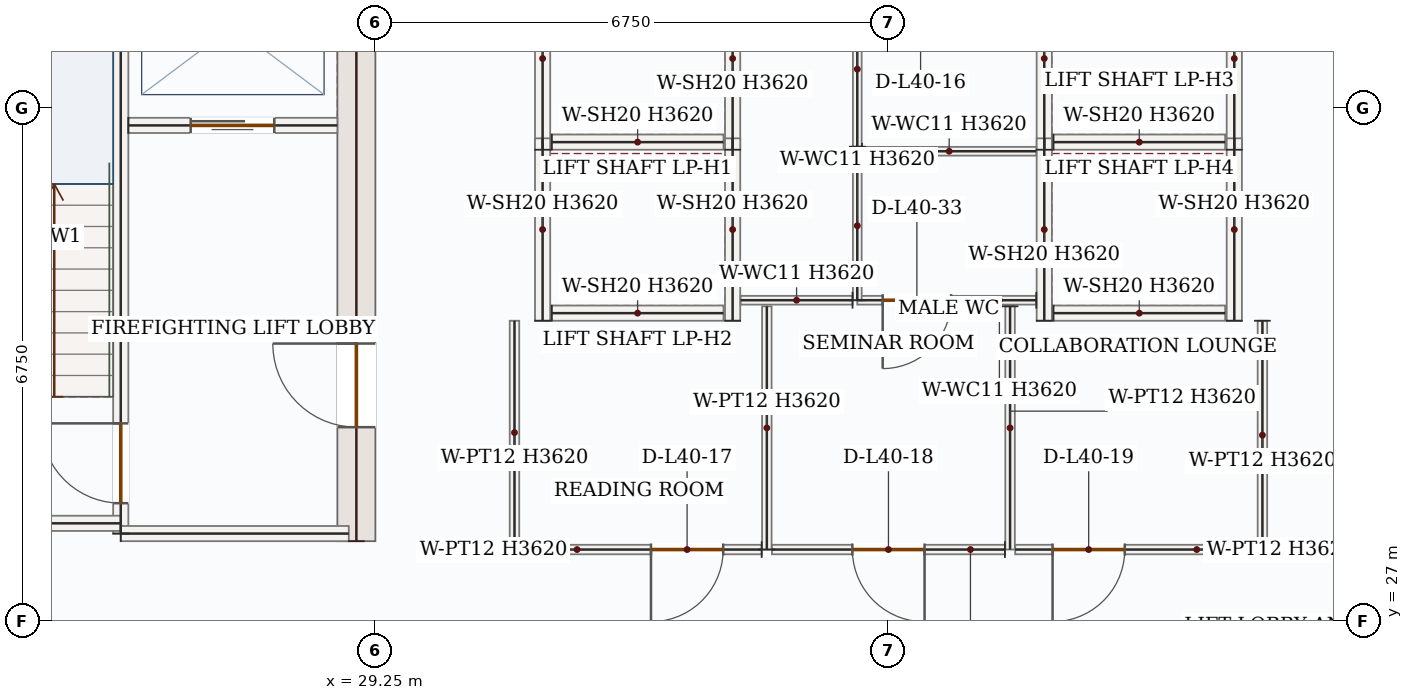
"""IFC4 building model, lengths in metres.
Left out: names, types, materials, properties, quantities, classifications, styles, units other than length and angle.
Written with IfcOpenShell. Run it as: python <this file> out.ifc"""

import sys

from ifc_helpers import new_model, si_unit, direction, frame, frame_2d, origin, place, context, subcontext, project, spatial, rectangle, extrude, source, transform, mapped, element, fill, save


model = new_model("IFC4")
c1 = context("Model", 3, precision=1e-05, world=origin(), true_north=direction((0.0, 1.0)))
c2 = subcontext(c1, "Body", "Model", "MODEL_VIEW")
j1 = project(units=[si_unit("LENGTHUNIT", "METRE"), si_unit("PLANEANGLEUNIT", "RADIAN")], contexts=[c1])
p1 = place(None, origin())
s1 = spatial("IfcSite", under=j1, at=p1, CompositionType="ELEMENT")
p2 = place(p1, origin())
s2 = spatial("IfcBuilding", under=s1, at=p2, CompositionType="ELEMENT")
p3 = place(p2, frame((0.0, 0.0, 174.6)))
s3 = spatial("IfcBuildingStorey", under=s2, at=p3, CompositionType="ELEMENT", Elevation=174.6)
p4 = place(p3, frame((29.0, 28.05, 0.0), z_axis=(0.0, 0.0, 1.0), x_axis=(0.0, 1.0, 0.0)))
e1 = element("IfcWall", 1, at=p4, inside=s3, PredefinedType="SHEAR", context=c2, shape_type="SweptSolid", body=[
    extrude(rectangle(XDim=8.55, YDim=0.5, at=frame_2d((4.275, 0.0))), origin(), (0.0, 0.0, 1.0), 3.62),
])
p5 = place(p4, frame((1.5, 0.0, 0.0)))
e2 = element("IfcOpeningElement", 2, at=p5, cuts=e1, PredefinedType="OPENING", context=c2, shape_type="SweptSolid", body=[
    extrude(rectangle(XDim=1.1, YDim=2.2, at=frame_2d((0.55, 1.1))), frame((0.0, 0.26, 0.0), z_axis=(0.0, -1.0, 0.0), x_axis=(1.0, 0.0, 0.0)), (0.0, 0.0, 1.0), 0.52),
])
p6 = place(p3, frame((25.9, 28.15, 0.0), z_axis=(0.0, 0.0, 1.0), x_axis=(0.0, 1.0, 0.0)))
e3 = element("IfcWall", 3, at=p6, inside=s3, PredefinedType="SOLIDWALL", context=c2, shape_type="SweptSolid", body=[
    extrude(rectangle(XDim=8.0, YDim=0.2, at=frame_2d((4.0, 0.0))), origin(), (0.0, 0.0, 1.0), 3.62),
])
p7 = place(p6, frame((0.4, 0.0, 0.0)))
e4 = element("IfcOpeningElement", 4, at=p7, cuts=e3, PredefinedType="OPENING", context=c2, shape_type="SweptSolid", body=[
    extrude(rectangle(XDim=1.05, YDim=2.15, at=frame_2d((0.525, 1.075))), frame((0.0, 0.11, 0.0), z_axis=(0.0, -1.0, 0.0), x_axis=(1.0, 0.0, 0.0)), (0.0, 0.0, 1.0), 0.22),
])
m1 = source(origin(), c2, "Body", "SweptSolid", [
    extrude(rectangle(XDim=4.25, YDim=0.2, at=frame_2d((2.125, 0.0))), origin(), (0.0, 0.0, 1.0), 3.62),
])
p8 = place(p3, frame((21.65, 28.285, 0.0), z_axis=(0.0, 0.0, 1.0), x_axis=(1.0, 0.0, 0.0)))
e5 = element("IfcWall", 5, at=p8, inside=s3, PredefinedType="SOLIDWALL", context=c2, shape_type="MappedRepresentation", body=[
    mapped(m1, transform((0.0, 0.0, 0.0), x_axis=(1.0, 0.0, 0.0), y_axis=(0.0, 1.0, 0.0), z_axis=(0.0, 0.0, 1.0), scale=1.0)),
])
m2 = source(origin(), c2, "Body", "SweptSolid", [
    extrude(rectangle(XDim=3.0, YDim=0.2, at=frame_2d((1.5, 0.0))), origin(), (0.0, 0.0, 1.0), 3.62),
])
p9 = place(p3, frame((25.9, 28.15, 0.0), z_axis=(0.0, 0.0, 1.0), x_axis=(1.0, 0.0, 0.0)))
e6 = element("IfcWall", 6, at=p9, inside=s3, PredefinedType="SOLIDWALL", context=c2, shape_type="MappedRepresentation", body=[
    mapped(m2, transform((0.0, 0.0, 0.0), x_axis=(1.0, 0.0, 0.0), y_axis=(0.0, 1.0, 0.0), z_axis=(0.0, 0.0, 1.0), scale=1.0)),
])
p10 = place(p3, frame((26.0, 33.52, 0.0), z_axis=(0.0, 0.0, 1.0), x_axis=(1.0, 0.0, 0.0)))
e7 = element("IfcWall", 7, at=p10, inside=s3, PredefinedType="SOLIDWALL", context=c2, shape_type="SweptSolid", body=[
    extrude(rectangle(XDim=2.75, YDim=0.2, at=frame_2d((1.375, 0.0))), origin(), (0.0, 0.0, 1.0), 3.62),
])
p11 = place(p10, frame((0.82, 0.0, 0.0)))
e8 = element("IfcOpeningElement", 8, at=p11, cuts=e7, PredefinedType="OPENING", context=c2, shape_type="SweptSolid", body=[
    extrude(rectangle(XDim=1.1, YDim=2.15, at=frame_2d((0.55, 1.075))), frame((0.0, 0.11, 0.0), z_axis=(0.0, -1.0, 0.0), x_axis=(1.0, 0.0, 0.0)), (0.0, 0.0, 1.0), 0.22),
])
m3 = source(origin(), c2, "Body", "SweptSolid", [
    extrude(rectangle(XDim=2.4, YDim=0.2, at=frame_2d((1.2, 0.0))), origin(), (0.0, 0.0, 1.0), 3.62),
])
for number, where, z_axis, x_axis in (
    (9, (31.45, 33.2, 0.0), (0.0, 0.0, 1.0), (0.0, 1.0, 0.0)),
    (10, (33.95, 33.2, 0.0), (0.0, 0.0, 1.0), (0.0, 1.0, 0.0)),
):
    element("IfcWall", number, at=place(p3, frame(where, z_axis=z_axis, x_axis=x_axis)), inside=s3, PredefinedType="SOLIDWALL", context=c2, shape_type="MappedRepresentation", body=[
        mapped(m3, transform((0.0, 0.0, 0.0), x_axis=(1.0, 0.0, 0.0), y_axis=(0.0, 1.0, 0.0), z_axis=(0.0, 0.0, 1.0), scale=1.0)),
    ])
m4 = source(origin(), c2, "Body", "SweptSolid", [
    extrude(rectangle(XDim=2.26, YDim=0.2, at=frame_2d((1.13, 0.0))), origin(), (0.0, 0.0, 1.0), 3.62),
])
p12 = place(p3, frame((31.57, 33.3, 0.0), z_axis=(0.0, 0.0, 1.0), x_axis=(1.0, 0.0, 0.0)))
e11 = element("IfcWall", 11, at=p12, inside=s3, PredefinedType="SOLIDWALL", context=c2, shape_type="MappedRepresentation", body=[
    mapped(m4, transform((0.0, 0.0, 0.0), x_axis=(1.0, 0.0, 0.0), y_axis=(0.0, 1.0, 0.0), z_axis=(0.0, 0.0, 1.0), scale=1.0)),
])
for number, where, z_axis, x_axis in (
    (12, (31.45, 30.95, 0.0), (0.0, 0.0, 1.0), (0.0, 1.0, 0.0)),
    (13, (33.95, 30.95, 0.0), (0.0, 0.0, 1.0), (0.0, 1.0, 0.0)),
):
    element("IfcWall", number, at=place(p3, frame(where, z_axis=z_axis, x_axis=x_axis)), inside=s3, PredefinedType="SOLIDWALL", context=c2, shape_type="MappedRepresentation", body=[
        mapped(m3, transform((0.0, 0.0, 0.0), x_axis=(1.0, 0.0, 0.0), y_axis=(0.0, 1.0, 0.0), z_axis=(0.0, 0.0, 1.0), scale=1.0)),
    ])
p13 = place(p3, frame((31.57, 31.05, 0.0), z_axis=(0.0, 0.0, 1.0), x_axis=(1.0, 0.0, 0.0)))
e14 = element("IfcWall", 14, at=p13, inside=s3, PredefinedType="SOLIDWALL", context=c2, shape_type="MappedRepresentation", body=[
    mapped(m4, transform((0.0, 0.0, 0.0), x_axis=(1.0, 0.0, 0.0), y_axis=(0.0, 1.0, 0.0), z_axis=(0.0, 0.0, 1.0), scale=1.0)),
])
for number, where, z_axis, x_axis in (
    (15, (38.05, 33.2, 0.0), (0.0, 0.0, 1.0), (0.0, 1.0, 0.0)),
    (16, (40.55, 33.2, 0.0), (0.0, 0.0, 1.0), (0.0, 1.0, 0.0)),
):
    element("IfcWall", number, at=place(p3, frame(where, z_axis=z_axis, x_axis=x_axis)), inside=s3, PredefinedType="SOLIDWALL", context=c2, shape_type="MappedRepresentation", body=[
        mapped(m3, transform((0.0, 0.0, 0.0), x_axis=(1.0, 0.0, 0.0), y_axis=(0.0, 1.0, 0.0), z_axis=(0.0, 0.0, 1.0), scale=1.0)),
    ])
p14 = place(p3, frame((38.17, 33.3, 0.0), z_axis=(0.0, 0.0, 1.0), x_axis=(1.0, 0.0, 0.0)))
e17 = element("IfcWall", 17, at=p14, inside=s3, PredefinedType="SOLIDWALL", context=c2, shape_type="MappedRepresentation", body=[
    mapped(m4, transform((0.0, 0.0, 0.0), x_axis=(1.0, 0.0, 0.0), y_axis=(0.0, 1.0, 0.0), z_axis=(0.0, 0.0, 1.0), scale=1.0)),
])
for number, where, z_axis, x_axis in (
    (18, (38.05, 30.95, 0.0), (0.0, 0.0, 1.0), (0.0, 1.0, 0.0)),
    (19, (40.55, 30.95, 0.0), (0.0, 0.0, 1.0), (0.0, 1.0, 0.0)),
):
    element("IfcWall", number, at=place(p3, frame(where, z_axis=z_axis, x_axis=x_axis)), inside=s3, PredefinedType="SOLIDWALL", context=c2, shape_type="MappedRepresentation", body=[
        mapped(m3, transform((0.0, 0.0, 0.0), x_axis=(1.0, 0.0, 0.0), y_axis=(0.0, 1.0, 0.0), z_axis=(0.0, 0.0, 1.0), scale=1.0)),
    ])
p15 = place(p3, frame((38.17, 31.05, 0.0), z_axis=(0.0, 0.0, 1.0), x_axis=(1.0, 0.0, 0.0)))
e20 = element("IfcWall", 20, at=p15, inside=s3, PredefinedType="SOLIDWALL", context=c2, shape_type="MappedRepresentation", body=[
    mapped(m4, transform((0.0, 0.0, 0.0), x_axis=(1.0, 0.0, 0.0), y_axis=(0.0, 1.0, 0.0), z_axis=(0.0, 0.0, 1.0), scale=1.0)),
])
p16 = place(p3, frame((37.945, 31.22, 0.0), z_axis=(0.0, 0.0, 1.0), x_axis=(-1.0, 0.0, 0.0)))
e21 = element("IfcWall", 21, at=p16, inside=s3, PredefinedType="PARTITIONING", context=c2, shape_type="SweptSolid", body=[
    extrude(rectangle(XDim=2.355, YDim=0.115, at=frame_2d((1.177, 0.0))), origin(), (0.0, 0.0, 1.0), 3.62),
])
p17 = place(p16, frame((1.121, 0.0, 0.0)))
e22 = element("IfcOpeningElement", 22, at=p17, cuts=e21, PredefinedType="OPENING", context=c2, shape_type="SweptSolid", body=[
    extrude(rectangle(XDim=0.9, YDim=2.1, at=frame_2d((0.45, 1.05))), frame((0.0, 0.067, 0.0), z_axis=(0.0, -1.0, 0.0), x_axis=(1.0, 0.0, 0.0)), (0.0, 0.0, 1.0), 0.135),
])
m5 = source(origin(), c2, "Body", "SweptSolid", [
    extrude(rectangle(XDim=1.96, YDim=0.115, at=frame_2d((0.98, 0.0))), origin(), (0.0, 0.0, 1.0), 3.62),
])
p18 = place(p3, frame((35.59, 31.22, 0.0), z_axis=(0.0, 0.0, 1.0), x_axis=(0.0, 1.0, 0.0)))
e23 = element("IfcWall", 23, at=p18, inside=s3, PredefinedType="PARTITIONING", context=c2, shape_type="MappedRepresentation", body=[
    mapped(m5, transform((0.0, 0.0, 0.0), x_axis=(1.0, 0.0, 0.0), y_axis=(0.0, 1.0, 0.0), z_axis=(0.0, 0.0, 1.0), scale=1.0)),
])
m6 = source(origin(), c2, "Body", "SweptSolid", [
    extrude(rectangle(XDim=2.292, YDim=0.115, at=frame_2d((1.146, 0.0))), origin(), (0.0, 0.0, 1.0), 3.62),
])
p19 = place(p3, frame((35.653, 33.18, 0.0), z_axis=(0.0, 0.0, 1.0), x_axis=(1.0, 0.0, 0.0)))
e24 = element("IfcWall", 24, at=p19, inside=s3, PredefinedType="PARTITIONING", context=c2, shape_type="MappedRepresentation", body=[
    mapped(m6, transform((0.0, 0.0, 0.0), x_axis=(1.0, 0.0, 0.0), y_axis=(0.0, 1.0, 0.0), z_axis=(0.0, 0.0, 1.0), scale=1.0)),
])
m7 = source(origin(), c2, "Body", "SweptSolid", [
    extrude(rectangle(XDim=2.04, YDim=0.115, at=frame_2d((1.02, 0.0))), origin(), (0.0, 0.0, 1.0), 3.62),
])
p20 = place(p3, frame((35.59, 33.24, 0.0), z_axis=(0.0, 0.0, 1.0), x_axis=(0.0, 1.0, 0.0)))
e25 = element("IfcWall", 25, at=p20, inside=s3, PredefinedType="PARTITIONING", context=c2, shape_type="MappedRepresentation", body=[
    mapped(m7, transform((0.0, 0.0, 0.0), x_axis=(1.0, 0.0, 0.0), y_axis=(0.0, 1.0, 0.0), z_axis=(0.0, 0.0, 1.0), scale=1.0)),
])
m8 = source(origin(), c2, "Body", "SweptSolid", [
    extrude(rectangle(XDim=1.473, YDim=0.115, at=frame_2d((0.736, 0.0))), origin(), (0.0, 0.0, 1.0), 3.62),
])
p21 = place(p3, frame((35.528, 31.22, 0.0), z_axis=(0.0, 0.0, 1.0), x_axis=(-1.0, 0.0, 0.0)))
e26 = element("IfcWall", 26, at=p21, inside=s3, PredefinedType="PARTITIONING", context=c2, shape_type="MappedRepresentation", body=[
    mapped(m8, transform((0.0, 0.0, 0.0), x_axis=(1.0, 0.0, 0.0), y_axis=(0.0, 1.0, 0.0), z_axis=(0.0, 0.0, 1.0), scale=1.0)),
])
m9 = source(origin(), c2, "Body", "SweptSolid", [
    extrude(rectangle(XDim=3.2, YDim=0.125, at=frame_2d((1.6, 0.0))), origin(), (0.0, 0.0, 1.0), 3.62),
])
for number, where, z_axis, x_axis in (
    (27, (34.4, 27.94, 0.0), (0.0, 0.0, 1.0), (0.0, 1.0, 0.0)),
    (28, (37.6, 31.14, 0.0), (0.0, 0.0, 1.0), (0.0, -1.0, 0.0)),
):
    element("IfcWall", number, at=place(p3, frame(where, z_axis=z_axis, x_axis=x_axis)), inside=s3, PredefinedType="PARTITIONING", context=c2, shape_type="MappedRepresentation", body=[
        mapped(m9, transform((0.0, 0.0, 0.0), x_axis=(1.0, 0.0, 0.0), y_axis=(0.0, 1.0, 0.0), z_axis=(0.0, 0.0, 1.0), scale=1.0)),
    ])
p22 = place(p3, frame((37.532, 27.94, 0.0), z_axis=(0.0, 0.0, 1.0), x_axis=(-1.0, 0.0, 0.0)))
e29 = element("IfcWall", 29, at=p22, inside=s3, PredefinedType="PARTITIONING", context=c2, shape_type="SweptSolid", body=[
    extrude(rectangle(XDim=3.065, YDim=0.125, at=frame_2d((1.532, 0.0))), origin(), (0.0, 0.0, 1.0), 3.62),
])
p23 = place(p22, frame((1.058, 0.0, 0.0)))
e30 = element("IfcOpeningElement", 30, at=p23, cuts=e29, PredefinedType="OPENING", context=c2, shape_type="SweptSolid", body=[
    extrude(rectangle(XDim=0.95, YDim=2.15, at=frame_2d((0.475, 1.075))), frame((0.0, 0.073, 0.0), z_axis=(0.0, -1.0, 0.0), x_axis=(1.0, 0.0, 0.0)), (0.0, 0.0, 1.0), 0.145),
])
p24 = place(p3, frame((34.333, 27.94, 0.0), z_axis=(0.0, 0.0, 1.0), x_axis=(-1.0, 0.0, 0.0)))
e31 = element("IfcWall", 31, at=p24, inside=s3, PredefinedType="PARTITIONING", context=c2, shape_type="SweptSolid", body=[
    extrude(rectangle(XDim=3.252, YDim=0.125, at=frame_2d((1.626, 0.0))), origin(), (0.0, 0.0, 1.0), 3.62),
])
p25 = place(p24, frame((0.507, 0.0, 0.0)))
e32 = element("IfcOpeningElement", 32, at=p25, cuts=e31, PredefinedType="OPENING", context=c2, shape_type="SweptSolid", body=[
    extrude(rectangle(XDim=0.95, YDim=2.15, at=frame_2d((0.475, 1.075))), frame((0.0, 0.073, 0.0), z_axis=(0.0, -1.0, 0.0), x_axis=(1.0, 0.0, 0.0)), (0.0, 0.0, 1.0), 0.145),
])
m10 = source(origin(), c2, "Body", "SweptSolid", [
    extrude(rectangle(XDim=2.942, YDim=0.125, at=frame_2d((1.471, 0.0))), origin(), (0.0, 0.0, 1.0), 3.62),
])
p26 = place(p3, frame((31.08, 28.008, 0.0), z_axis=(0.0, 0.0, 1.0), x_axis=(0.0, 1.0, 0.0)))
e33 = element("IfcWall", 33, at=p26, inside=s3, PredefinedType="PARTITIONING", context=c2, shape_type="MappedRepresentation", body=[
    mapped(m10, transform((0.0, 0.0, 0.0), x_axis=(1.0, 0.0, 0.0), y_axis=(0.0, 1.0, 0.0), z_axis=(0.0, 0.0, 1.0), scale=1.0)),
])
m11 = source(origin(), c2, "Body", "SweptSolid", [
    extrude(rectangle(XDim=3.01, YDim=0.125, at=frame_2d((1.505, 0.0))), origin(), (0.0, 0.0, 1.0), 3.62),
])
p27 = place(p3, frame((40.92, 30.95, 0.0), z_axis=(0.0, 0.0, 1.0), x_axis=(0.0, -1.0, 0.0)))
e34 = element("IfcWall", 34, at=p27, inside=s3, PredefinedType="PARTITIONING", context=c2, shape_type="MappedRepresentation", body=[
    mapped(m11, transform((0.0, 0.0, 0.0), x_axis=(1.0, 0.0, 0.0), y_axis=(0.0, 1.0, 0.0), z_axis=(0.0, 0.0, 1.0), scale=1.0)),
])
p28 = place(p3, frame((40.853, 27.94, 0.0), z_axis=(0.0, 0.0, 1.0), x_axis=(-1.0, 0.0, 0.0)))
e35 = element("IfcWall", 35, at=p28, inside=s3, PredefinedType="PARTITIONING", context=c2, shape_type="SweptSolid", body=[
    extrude(rectangle(XDim=3.185, YDim=0.125, at=frame_2d((1.593, 0.0))), origin(), (0.0, 0.0, 1.0), 3.62),
])
p29 = place(p28, frame((1.743, 0.0, 0.0)))
e36 = element("IfcOpeningElement", 36, at=p29, cuts=e35, PredefinedType="OPENING", context=c2, shape_type="SweptSolid", body=[
    extrude(rectangle(XDim=0.95, YDim=2.15, at=frame_2d((0.475, 1.075))), frame((0.0, 0.073, 0.0), z_axis=(0.0, -1.0, 0.0), x_axis=(1.0, 0.0, 0.0)), (0.0, 0.0, 1.0), 0.145),
])
m12 = source(origin(), c2, "Body", "SweptSolid", [
    extrude(rectangle(XDim=1.05, YDim=2.15, at=frame_2d((0.525, 1.075))), frame((0.0, 0.025, 0.0), z_axis=(0.0, -1.0, 0.0), x_axis=(1.0, 0.0, 0.0)), (0.0, 0.0, 1.0), 0.05),
])
p30 = place(p7, origin())
e37 = element("IfcDoor", 37, at=p30, inside=s3, OperationType="SINGLE_SWING_RIGHT", PredefinedType="DOOR", context=c2, shape_type="MappedRepresentation", body=[
    mapped(m12, transform((0.0, 0.0, 0.0), x_axis=(1.0, 0.0, 0.0), y_axis=(0.0, 1.0, 0.0), z_axis=(0.0, 0.0, 1.0), scale=1.0)),
])
fill(e4, e37)
m13 = source(origin(), c2, "Body", "SweptSolid", [
    extrude(rectangle(XDim=1.1, YDim=2.15, at=frame_2d((0.55, 1.075))), frame((0.0, 0.025, 0.0), z_axis=(0.0, -1.0, 0.0), x_axis=(1.0, 0.0, 0.0)), (0.0, 0.0, 1.0), 0.05),
])
p31 = place(p11, origin())
e38 = element("IfcDoor", 38, at=p31, inside=s3, OperationType="DOUBLE_DOOR_SLIDING", PredefinedType="DOOR", context=c2, shape_type="MappedRepresentation", body=[
    mapped(m13, transform((0.0, 0.0, 0.0), x_axis=(1.0, 0.0, 0.0), y_axis=(0.0, 1.0, 0.0), z_axis=(0.0, 0.0, 1.0), scale=1.0)),
])
fill(e8, e38)
m14 = source(origin(), c2, "Body", "SweptSolid", [
    extrude(rectangle(XDim=1.1, YDim=2.2, at=frame_2d((0.55, 1.1))), frame((0.0, 0.025, 0.0), z_axis=(0.0, -1.0, 0.0), x_axis=(1.0, 0.0, 0.0)), (0.0, 0.0, 1.0), 0.05),
])
p32 = place(p5, origin())
e39 = element("IfcDoor", 39, at=p32, inside=s3, OperationType="SINGLE_SWING_RIGHT", PredefinedType="DOOR", context=c2, shape_type="MappedRepresentation", body=[
    mapped(m14, transform((0.0, 0.0, 0.0), x_axis=(1.0, 0.0, 0.0), y_axis=(0.0, 1.0, 0.0), z_axis=(0.0, 0.0, 1.0), scale=1.0)),
])
fill(e2, e39)
m15 = source(origin(), c2, "Body", "SweptSolid", [
    extrude(rectangle(XDim=0.95, YDim=2.15, at=frame_2d((0.475, 1.075))), frame((0.0, 0.025, 0.0), z_axis=(0.0, -1.0, 0.0), x_axis=(1.0, 0.0, 0.0)), (0.0, 0.0, 1.0), 0.05),
])
p33 = place(p25, origin())
e40 = element("IfcDoor", 40, at=p33, inside=s3, OperationType="SINGLE_SWING_RIGHT", PredefinedType="DOOR", context=c2, shape_type="MappedRepresentation", body=[
    mapped(m15, transform((0.0, 0.0, 0.0), x_axis=(1.0, 0.0, 0.0), y_axis=(0.0, 1.0, 0.0), z_axis=(0.0, 0.0, 1.0), scale=1.0)),
])
fill(e32, e40)
p34 = place(p23, origin())
e41 = element("IfcDoor", 41, at=p34, inside=s3, OperationType="SINGLE_SWING_LEFT", PredefinedType="DOOR", context=c2, shape_type="MappedRepresentation", body=[
    mapped(m15, transform((0.0, 0.0, 0.0), x_axis=(1.0, 0.0, 0.0), y_axis=(0.0, 1.0, 0.0), z_axis=(0.0, 0.0, 1.0), scale=1.0)),
])
fill(e30, e41)
p35 = place(p29, origin())
e42 = element("IfcDoor", 42, at=p35, inside=s3, OperationType="SINGLE_SWING_RIGHT", PredefinedType="DOOR", context=c2, shape_type="MappedRepresentation", body=[
    mapped(m15, transform((0.0, 0.0, 0.0), x_axis=(1.0, 0.0, 0.0), y_axis=(0.0, 1.0, 0.0), z_axis=(0.0, 0.0, 1.0), scale=1.0)),
])
fill(e36, e42)
m16 = source(origin(), c2, "Body", "SweptSolid", [
    extrude(rectangle(XDim=0.9, YDim=2.1, at=frame_2d((0.45, 1.05))), frame((0.0, 0.025, 0.0), z_axis=(0.0, -1.0, 0.0), x_axis=(1.0, 0.0, 0.0)), (0.0, 0.0, 1.0), 0.05),
])
p36 = place(p17, origin())
e43 = element("IfcDoor", 43, at=p36, inside=s3, OperationType="SINGLE_SWING_RIGHT", PredefinedType="DOOR", context=c2, shape_type="MappedRepresentation", body=[
    mapped(m16, transform((0.0, 0.0, 0.0), x_axis=(1.0, 0.0, 0.0), y_axis=(0.0, 1.0, 0.0), z_axis=(0.0, 0.0, 1.0), scale=1.0)),
])
fill(e22, e43)
save(model, sys.argv[1])
